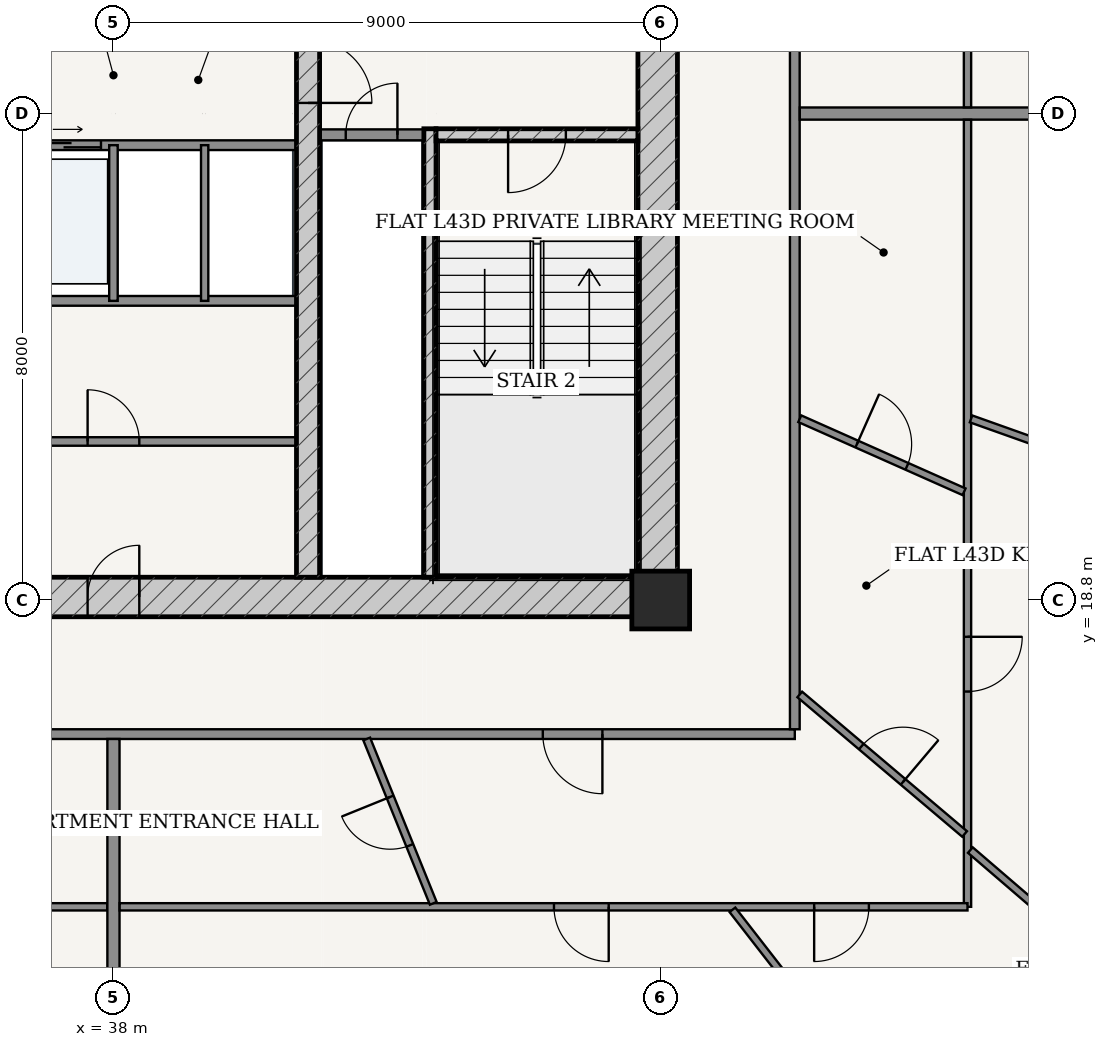
"""IFC4 building model, lengths in metres.
Left out: names, types, materials, properties, quantities, classifications, styles, units other than length and angle.
Written with IfcOpenShell. Run it as: python <this file> out.ifc"""

import sys

from ifc_helpers import new_model, si_unit, direction, frame, frame_2d, origin, origin_2d, place, context, subcontext, project, spatial, rectangle, extrude, source, transform, mapped, element, fill, save


model = new_model("IFC4")
c1 = context("Model", 3, precision=1e-05, world=origin(), true_north=direction((-0.2419218956, 0.970295726276)))
c2 = subcontext(c1, "Body", "Model", "MODEL_VIEW")
j1 = project(units=[si_unit("LENGTHUNIT", "METRE"), si_unit("PLANEANGLEUNIT", "RADIAN")], contexts=[c1])
p1 = place(None, origin())
s1 = spatial("IfcSite", under=j1, at=p1, CompositionType="ELEMENT")
p2 = place(p1, origin())
s2 = spatial("IfcBuilding", under=s1, at=p2, CompositionType="ELEMENT")
p3 = place(p2, frame((0.0, 0.0, 164.2)))
s3 = spatial("IfcBuildingStorey", under=s2, at=p3, CompositionType="ELEMENT", Elevation=164.2)
p4 = place(p3, frame((47.0, 18.8, 0.0), z_axis=(0.0, 0.0, 1.0), x_axis=(1.0, 0.0, 0.0)))
e1 = element("IfcColumn", 1, at=p4, inside=s3, PredefinedType="COLUMN", context=c2, shape_type="SweptSolid", body=[
    extrude(rectangle(XDim=0.95, YDim=0.95, at=origin_2d()), origin(), (0.0, 0.0, 1.0), 3.6),
])
p5 = place(p3, frame((28.725, 18.85, 0.0), z_axis=(0.0, 0.0, 1.0), x_axis=(1.0, 0.0, 0.0)))
e2 = element("IfcWall", 2, at=p5, inside=s3, PredefinedType="SHEAR", context=c2, shape_type="SweptSolid", body=[
    extrude(rectangle(XDim=18.55, YDim=0.65, at=frame_2d((9.275, 0.0))), origin(), (0.0, 0.0, 1.0), 3.33),
])
p6 = place(p5, frame((8.85, 0.0, 0.0)))
e3 = element("IfcOpeningElement", 3, at=p6, cuts=e2, PredefinedType="OPENING", context=c2, shape_type="SweptSolid", body=[
    extrude(rectangle(XDim=0.85, YDim=2.1, at=frame_2d((0.425, 1.05))), frame((0.0, 0.335, 0.0), z_axis=(0.0, -1.0, 0.0), x_axis=(1.0, 0.0, 0.0)), (0.0, 0.0, 1.0), 0.67),
])
p7 = place(p3, frame((46.95, 19.175, 0.0), z_axis=(0.0, 0.0, 1.0), x_axis=(0.0, 1.0, 0.0)))
e4 = element("IfcWall", 4, at=p7, inside=s3, PredefinedType="SHEAR", context=c2, shape_type="SweptSolid", body=[
    extrude(rectangle(XDim=15.25, YDim=0.65, at=frame_2d((7.625, 0.0))), origin(), (0.0, 0.0, 1.0), 3.33),
])
p8 = place(p7, frame((9.875, 0.0, 0.0)))
e5 = element("IfcOpeningElement", 5, at=p8, cuts=e4, PredefinedType="OPENING", context=c2, shape_type="SweptSolid", body=[
    extrude(rectangle(XDim=1.5, YDim=2.2, at=frame_2d((0.75, 1.1))), frame((0.0, 0.335, 0.0), z_axis=(0.0, -1.0, 0.0), x_axis=(1.0, 0.0, 0.0)), (0.0, 0.0, 1.0), 0.67),
])
p9 = place(p3, frame((43.205, 19.175, 0.0), z_axis=(0.0, 0.0, 1.0), x_axis=(0.0, 1.0, 0.0)))
e6 = element("IfcWall", 6, at=p9, inside=s3, PredefinedType="SOLIDWALL", context=c2, shape_type="SweptSolid", body=[
    extrude(rectangle(XDim=7.375, YDim=0.2, at=frame_2d((3.688, 0.0))), origin(), (0.0, 0.0, 1.0), 3.33),
])
p10 = place(p3, frame((43.305, 26.45, 0.0), z_axis=(0.0, 0.0, 1.0), x_axis=(1.0, 0.0, 0.0)))
e7 = element("IfcWall", 7, at=p10, inside=s3, PredefinedType="SOLIDWALL", context=c2, shape_type="SweptSolid", body=[
    extrude(rectangle(XDim=3.32, YDim=0.2, at=frame_2d((1.66, 0.0))), origin(), (0.0, 0.0, 1.0), 3.33),
])
p11 = place(p10, frame((1.185, 0.0, 0.0)))
e8 = element("IfcOpeningElement", 8, at=p11, cuts=e7, PredefinedType="OPENING", context=c2, shape_type="SweptSolid", body=[
    extrude(rectangle(XDim=0.95, YDim=2.15, at=frame_2d((0.475, 1.075))), frame((0.0, 0.11, 0.0), z_axis=(0.0, -1.0, 0.0), x_axis=(1.0, 0.0, 0.0)), (0.0, 0.0, 1.0), 0.22),
])
p12 = place(p3, frame((41.2, 19.175, 0.0), z_axis=(0.0, 0.0, 1.0), x_axis=(0.0, 1.0, 0.0)))
e9 = element("IfcWall", 9, at=p12, inside=s3, PredefinedType="SHEAR", context=c2, shape_type="SweptSolid", body=[
    extrude(rectangle(XDim=15.25, YDim=0.38, at=frame_2d((7.625, 0.0))), origin(), (0.0, 0.0, 1.0), 3.33),
])
p13 = place(p12, frame((7.8, 0.0, 0.0)))
e10 = element("IfcOpeningElement", 10, at=p13, cuts=e9, PredefinedType="OPENING", context=c2, shape_type="SweptSolid", body=[
    extrude(rectangle(XDim=1.05, YDim=2.15, at=frame_2d((0.525, 1.075))), frame((0.0, 0.2, 0.0), z_axis=(0.0, -1.0, 0.0), x_axis=(1.0, 0.0, 0.0)), (0.0, 0.0, 1.0), 0.4),
])
p14 = place(p3, frame((41.39, 26.45, 0.0), z_axis=(0.0, 0.0, 1.0), x_axis=(1.0, 0.0, 0.0)))
e11 = element("IfcWall", 11, at=p14, inside=s3, PredefinedType="PARTITIONING", context=c2, shape_type="SweptSolid", body=[
    extrude(rectangle(XDim=1.71, YDim=0.18, at=frame_2d((0.855, 0.0))), origin(), (0.0, 0.0, 1.0), 3.33),
])
p15 = place(p14, frame((0.43, 0.0, 0.0)))
e12 = element("IfcOpeningElement", 12, at=p15, cuts=e11, PredefinedType="OPENING", context=c2, shape_type="SweptSolid", body=[
    extrude(rectangle(XDim=0.85, YDim=2.1, at=frame_2d((0.425, 1.05))), frame((0.0, 0.1, 0.0), z_axis=(0.0, -1.0, 0.0), x_axis=(1.0, 0.0, 0.0)), (0.0, 0.0, 1.0), 0.2),
])
p16 = place(p3, frame((34.99, 26.28, 0.0), z_axis=(0.0, 0.0, 1.0), x_axis=(1.0, 0.0, 0.0)))
e13 = element("IfcWall", 13, at=p16, inside=s3, PredefinedType="PARTITIONING", context=c2, shape_type="SweptSolid", body=[
    extrude(rectangle(XDim=6.02, YDim=0.16, at=frame_2d((3.01, 0.0))), origin(), (0.0, 0.0, 1.0), 3.33),
])
p17 = place(p16, frame((0.225, 0.0, 0.0)))
e14 = element("IfcOpeningElement", 14, at=p17, cuts=e13, PredefinedType="OPENING", context=c2, shape_type="SweptSolid", body=[
    extrude(rectangle(XDim=1.1, YDim=2.2, at=frame_2d((0.55, 1.1))), frame((0.0, 0.09, 0.0), z_axis=(0.0, -1.0, 0.0), x_axis=(1.0, 0.0, 0.0)), (0.0, 0.0, 1.0), 0.18),
])
p18 = place(p16, frame((1.705, 0.0, 0.0)))
e15 = element("IfcOpeningElement", 15, at=p18, cuts=e13, PredefinedType="OPENING", context=c2, shape_type="SweptSolid", body=[
    extrude(rectangle(XDim=1.1, YDim=2.2, at=frame_2d((0.55, 1.1))), frame((0.0, 0.09, 0.0), z_axis=(0.0, -1.0, 0.0), x_axis=(1.0, 0.0, 0.0)), (0.0, 0.0, 1.0), 0.18),
])
p19 = place(p3, frame((34.99, 23.72, 0.0), z_axis=(0.0, 0.0, 1.0), x_axis=(1.0, 0.0, 0.0)))
e16 = element("IfcWall", 16, at=p19, inside=s3, PredefinedType="PARTITIONING", context=c2, shape_type="SweptSolid", body=[
    extrude(rectangle(XDim=6.02, YDim=0.16, at=frame_2d((3.01, 0.0))), origin(), (0.0, 0.0, 1.0), 3.33),
])
p20 = place(p3, frame((38.0, 23.72, 0.0), z_axis=(0.0, 0.0, 1.0), x_axis=(0.0, 1.0, 0.0)))
e17 = element("IfcWall", 17, at=p20, inside=s3, PredefinedType="PARTITIONING", context=c2, shape_type="SweptSolid", body=[
    extrude(rectangle(XDim=2.56, YDim=0.14, at=frame_2d((1.28, 0.0))), origin(), (0.0, 0.0, 1.0), 3.33),
])
p21 = place(p3, frame((39.5, 23.72, 0.0), z_axis=(0.0, 0.0, 1.0), x_axis=(0.0, 1.0, 0.0)))
e18 = element("IfcWall", 18, at=p21, inside=s3, PredefinedType="PARTITIONING", context=c2, shape_type="SweptSolid", body=[
    extrude(rectangle(XDim=2.56, YDim=0.12, at=frame_2d((1.28, 0.0))), origin(), (0.0, 0.0, 1.0), 3.33),
])
p22 = place(p3, frame((34.99, 21.407, 0.0), z_axis=(0.0, 0.0, 1.0), x_axis=(1.0, 0.0, 0.0)))
e19 = element("IfcWall", 19, at=p22, inside=s3, PredefinedType="PARTITIONING", context=c2, shape_type="SweptSolid", body=[
    extrude(rectangle(XDim=6.02, YDim=0.14, at=frame_2d((3.01, 0.0))), origin(), (0.0, 0.0, 1.0), 3.33),
])
p23 = place(p22, frame((2.585, 0.0, 0.0)))
e20 = element("IfcOpeningElement", 20, at=p23, cuts=e19, PredefinedType="OPENING", context=c2, shape_type="SweptSolid", body=[
    extrude(rectangle(XDim=0.85, YDim=2.1, at=frame_2d((0.425, 1.05))), frame((0.0, 0.08, 0.0), z_axis=(0.0, -1.0, 0.0), x_axis=(1.0, 0.0, 0.0)), (0.0, 0.0, 1.0), 0.16),
])
p24 = place(p3, frame((34.32, 16.595, 0.0), z_axis=(0.0, 0.0, 1.0), x_axis=(1.0, 0.0, 0.0)))
e21 = element("IfcWall", 21, at=p24, inside=s3, PredefinedType="PARTITIONING", context=c2, shape_type="SweptSolid", body=[
    extrude(rectangle(XDim=14.885, YDim=0.16, at=frame_2d((7.442, 0.0))), origin(), (0.0, 0.0, 1.0), 2.776),
])
p25 = place(p24, frame((1.484, 0.0, 0.0)))
e22 = element("IfcOpeningElement", 22, at=p25, cuts=e21, PredefinedType="OPENING", context=c2, shape_type="SweptSolid", body=[
    extrude(rectangle(XDim=0.98, YDim=2.2, at=frame_2d((0.49, 1.1))), frame((0.0, 0.09, 0.0), z_axis=(0.0, -1.0, 0.0), x_axis=(1.0, 0.0, 0.0)), (0.0, 0.0, 1.0), 0.18),
])
p26 = place(p24, frame((10.741, 0.0, 0.0)))
e23 = element("IfcOpeningElement", 23, at=p26, cuts=e21, PredefinedType="OPENING", context=c2, shape_type="SweptSolid", body=[
    extrude(rectangle(XDim=0.98, YDim=2.2, at=frame_2d((0.49, 1.1))), frame((0.0, 0.09, 0.0), z_axis=(0.0, -1.0, 0.0), x_axis=(1.0, 0.0, 0.0)), (0.0, 0.0, 1.0), 0.18),
])
p27 = place(p3, frame((49.205, 16.675, 0.0), z_axis=(0.0, 0.0, 1.0), x_axis=(0.0, 1.0, 0.0)))
e24 = element("IfcWall", 24, at=p27, inside=s3, PredefinedType="PARTITIONING", context=c2, shape_type="SweptSolid", body=[
    extrude(rectangle(XDim=18.4, YDim=0.16, at=frame_2d((9.2, 0.0))), origin(), (0.0, 0.0, 1.0), 2.776),
])
p28 = place(p27, frame((15.326, 0.0, 0.0)))
e25 = element("IfcOpeningElement", 25, at=p28, cuts=e24, PredefinedType="OPENING", context=c2, shape_type="SweptSolid", body=[
    extrude(rectangle(XDim=0.98, YDim=2.2, at=frame_2d((0.49, 1.1))), frame((0.0, 0.09, 0.0), z_axis=(0.0, -1.0, 0.0), x_axis=(1.0, 0.0, 0.0)), (0.0, 0.0, 1.0), 0.18),
])
p29 = place(p3, frame((49.287, 26.8, 0.0), z_axis=(0.0, 0.0, 1.0), x_axis=(1.0, 0.0, 0.0)))
e26 = element("IfcWall", 26, at=p29, inside=s3, PredefinedType="PARTITIONING", context=c2, shape_type="SweptSolid", body=[
    extrude(rectangle(XDim=12.853, YDim=0.2, at=frame_2d((6.426, 0.0))), origin(), (0.0, 0.0, 1.0), 2.846),
])
p30 = place(p3, frame((52.045, 37.995, 0.0), z_axis=(0.0, 0.0, 1.0), x_axis=(0.0, -1.0, 0.0)))
e27 = element("IfcWall", 27, at=p30, inside=s3, PredefinedType="PARTITIONING", context=c2, shape_type="SweptSolid", body=[
    extrude(rectangle(XDim=11.093, YDim=0.12, at=frame_2d((5.546, 0.0))), origin(), (0.0, 0.0, 1.0), 2.776),
])
p31 = place(p30, frame((4.638, 0.0, 0.0)))
e28 = element("IfcOpeningElement", 28, at=p31, cuts=e27, PredefinedType="OPENING", context=c2, shape_type="SweptSolid", body=[
    extrude(rectangle(XDim=0.9, YDim=2.15, at=frame_2d((0.45, 1.075))), frame((0.0, 0.07, 0.0), z_axis=(0.0, -1.0, 0.0), x_axis=(1.0, 0.0, 0.0)), (0.0, 0.0, 1.0), 0.14),
])
p32 = place(p3, frame((37.898, 13.755, 0.0), z_axis=(0.0, 0.0, 1.0), x_axis=(-1.0, 0.0, 0.0)))
e29 = element("IfcWall", 29, at=p32, inside=s3, PredefinedType="PARTITIONING", context=c2, shape_type="SweptSolid", body=[
    extrude(rectangle(XDim=6.418, YDim=0.12, at=frame_2d((3.209, 0.0))), origin(), (0.0, 0.0, 1.0), 2.776),
])
p33 = place(p32, frame((1.132, 0.0, 0.0)))
e30 = element("IfcOpeningElement", 30, at=p33, cuts=e29, PredefinedType="OPENING", context=c2, shape_type="SweptSolid", body=[
    extrude(rectangle(XDim=0.9, YDim=2.15, at=frame_2d((0.45, 1.075))), frame((0.0, 0.07, 0.0), z_axis=(0.0, -1.0, 0.0), x_axis=(1.0, 0.0, 0.0)), (0.0, 0.0, 1.0), 0.14),
])
p34 = place(p3, frame((38.0, 16.515, 0.0), z_axis=(0.0, 0.0, 1.0), x_axis=(0.0, -1.0, 0.0)))
e31 = element("IfcWall", 31, at=p34, inside=s3, PredefinedType="PARTITIONING", context=c2, shape_type="SweptSolid", body=[
    extrude(rectangle(XDim=10.455, YDim=0.2, at=frame_2d((5.228, 0.0))), origin(), (0.0, 0.0, 1.0), 2.846),
])
p35 = place(p3, frame((52.045, 26.698, 0.0), z_axis=(0.0, 0.0, 1.0), x_axis=(0.0, -1.0, 0.0)))
e32 = element("IfcWall", 32, at=p35, inside=s3, PredefinedType="PARTITIONING", context=c2, shape_type="SweptSolid", body=[
    extrude(rectangle(XDim=12.943, YDim=0.12, at=frame_2d((6.472, 0.0))), origin(), (0.0, 0.0, 1.0), 2.776),
])
p36 = place(p35, frame((8.503, 0.0, 0.0)))
e33 = element("IfcOpeningElement", 33, at=p36, cuts=e32, PredefinedType="OPENING", context=c2, shape_type="SweptSolid", body=[
    extrude(rectangle(XDim=0.9, YDim=2.15, at=frame_2d((0.45, 1.075))), frame((0.0, 0.07, 0.0), z_axis=(0.0, -1.0, 0.0), x_axis=(1.0, 0.0, 0.0)), (0.0, 0.0, 1.0), 0.14),
])
p37 = place(p3, frame((52.045, 13.755, 0.0), z_axis=(0.0, 0.0, 1.0), x_axis=(-1.0, 0.0, 0.0)))
e34 = element("IfcWall", 34, at=p37, inside=s3, PredefinedType="PARTITIONING", context=c2, shape_type="SweptSolid", body=[
    extrude(rectangle(XDim=13.943, YDim=0.12, at=frame_2d((6.971, 0.0))), origin(), (0.0, 0.0, 1.0), 2.776),
])
p38 = place(p37, frame((5.9, 0.0, 0.0)))
e35 = element("IfcOpeningElement", 35, at=p38, cuts=e34, PredefinedType="OPENING", context=c2, shape_type="SweptSolid", body=[
    extrude(rectangle(XDim=0.9, YDim=2.15, at=frame_2d((0.45, 1.075))), frame((0.0, 0.07, 0.0), z_axis=(0.0, -1.0, 0.0), x_axis=(1.0, 0.0, 0.0)), (0.0, 0.0, 1.0), 0.14),
])
p39 = place(p37, frame((1.622, 0.0, 0.0)))
e36 = element("IfcOpeningElement", 36, at=p39, cuts=e34, PredefinedType="OPENING", context=c2, shape_type="SweptSolid", body=[
    extrude(rectangle(XDim=0.9, YDim=2.15, at=frame_2d((0.45, 1.075))), frame((0.0, 0.07, 0.0), z_axis=(0.0, -1.0, 0.0), x_axis=(1.0, 0.0, 0.0)), (0.0, 0.0, 1.0), 0.14),
])
p40 = place(p3, frame((48.179, 13.706, 0.0), z_axis=(0.0, 0.0, 1.0), x_axis=(0.613759011764, -0.789493429662, 0.0)))
e37 = element("IfcWall", 37, at=p40, inside=s3, PredefinedType="PARTITIONING", context=c2, shape_type="SweptSolid", body=[
    extrude(rectangle(XDim=5.212, YDim=0.12, at=frame_2d((2.606, 0.0))), origin(), (0.0, 0.0, 1.0), 2.776),
])
p41 = place(p3, frame((52.092, 14.688, 0.0), z_axis=(0.0, 0.0, 1.0), x_axis=(0.758367509429, -0.651827216862, 0.0)))
e38 = element("IfcWall", 38, at=p41, inside=s3, PredefinedType="PARTITIONING", context=c2, shape_type="SweptSolid", body=[
    extrude(rectangle(XDim=3.918, YDim=0.12, at=frame_2d((1.959, 0.0))), origin(), (0.0, 0.0, 1.0), 2.846),
])
p42 = place(p3, frame((52.104, 21.779, 0.0), z_axis=(0.0, 0.0, 1.0), x_axis=(0.942081743482, -0.335383345736, 0.0)))
e39 = element("IfcWall", 39, at=p42, inside=s3, PredefinedType="PARTITIONING", context=c2, shape_type="SweptSolid", body=[
    extrude(rectangle(XDim=8.7, YDim=0.12, at=frame_2d((4.35, 0.0))), origin(), (0.0, 0.0, 1.0), 2.846),
])
p43 = place(p42, frame((3.9, 0.0, 0.0)))
e40 = element("IfcOpeningElement", 40, at=p43, cuts=e39, PredefinedType="OPENING", context=c2, shape_type="SweptSolid", body=[
    extrude(rectangle(XDim=0.9, YDim=2.15, at=frame_2d((0.45, 1.075))), frame((0.0, 0.07, 0.0), z_axis=(0.0, -1.0, 0.0), x_axis=(1.0, 0.0, 0.0)), (0.0, 0.0, 1.0), 0.14),
])
p44 = place(p3, frame((42.165, 16.515, 0.0), z_axis=(0.0, 0.0, 1.0), x_axis=(0.375386324206, -0.926868441365, 0.0)))
e41 = element("IfcWall", 41, at=p44, inside=s3, PredefinedType="PARTITIONING", context=c2, shape_type="SweptSolid", body=[
    extrude(rectangle(XDim=2.916, YDim=0.12, at=frame_2d((1.458, 0.0))), origin(), (0.0, 0.0, 1.0), 3.005),
])
p45 = place(p44, frame((1.028, 0.0, 0.0)))
e42 = element("IfcOpeningElement", 42, at=p45, cuts=e41, PredefinedType="OPENING", context=c2, shape_type="SweptSolid", body=[
    extrude(rectangle(XDim=0.86, YDim=2.15, at=frame_2d((0.43, 1.075))), frame((0.0, 0.07, 0.0), z_axis=(0.0, -1.0, 0.0), x_axis=(1.0, 0.0, 0.0)), (0.0, 0.0, 1.0), 0.14),
])
p46 = place(p3, frame((49.287, 17.248, 0.0), z_axis=(0.0, 0.0, 1.0), x_axis=(0.763274158734, -0.646074731443, 0.0)))
e43 = element("IfcWall", 43, at=p46, inside=s3, PredefinedType="PARTITIONING", context=c2, shape_type="SweptSolid", body=[
    extrude(rectangle(XDim=3.552, YDim=0.12, at=frame_2d((1.776, 0.0))), origin(), (0.0, 0.0, 1.0), 3.005),
])
p47 = place(p46, frame((1.326, 0.0, 0.0)))
e44 = element("IfcOpeningElement", 44, at=p47, cuts=e43, PredefinedType="OPENING", context=c2, shape_type="SweptSolid", body=[
    extrude(rectangle(XDim=0.9, YDim=2.15, at=frame_2d((0.45, 1.075))), frame((0.0, 0.07, 0.0), z_axis=(0.0, -1.0, 0.0), x_axis=(1.0, 0.0, 0.0)), (0.0, 0.0, 1.0), 0.14),
])
p48 = place(p3, frame((49.287, 21.781, 0.0), z_axis=(0.0, 0.0, 1.0), x_axis=(0.913743428873, -0.406291700864, 0.0)))
e45 = element("IfcWall", 45, at=p48, inside=s3, PredefinedType="PARTITIONING", context=c2, shape_type="SweptSolid", body=[
    extrude(rectangle(XDim=2.957, YDim=0.12, at=frame_2d((1.478, 0.0))), origin(), (0.0, 0.0, 1.0), 3.33),
])
p49 = place(p48, frame((1.028, 0.0, 0.0)))
e46 = element("IfcOpeningElement", 46, at=p49, cuts=e45, PredefinedType="OPENING", context=c2, shape_type="SweptSolid", body=[
    extrude(rectangle(XDim=0.9, YDim=2.15, at=frame_2d((0.45, 1.075))), frame((0.0, 0.07, 0.0), z_axis=(0.0, -1.0, 0.0), x_axis=(1.0, 0.0, 0.0)), (0.0, 0.0, 1.0), 0.14),
])
m1 = source(origin(), c2, "Body", "SweptSolid", [
    extrude(rectangle(XDim=1.05, YDim=2.15, at=frame_2d((0.525, 1.075))), frame((0.0, 0.025, 0.0), z_axis=(0.0, -1.0, 0.0), x_axis=(1.0, 0.0, 0.0)), (0.0, 0.0, 1.0), 0.05),
])
p50 = place(p13, frame((1.05, 0.0, 0.0), z_axis=(0.0, 0.0, 1.0), x_axis=(-1.0, 0.0, 0.0)))
e47 = element("IfcDoor", 47, at=p50, inside=s3, OperationType="SINGLE_SWING_RIGHT", PredefinedType="DOOR", context=c2, shape_type="MappedRepresentation", body=[
    mapped(m1, transform((0.0, 0.0, 0.0), scale=1.0)),
])
fill(e10, e47)
m2 = source(origin(), c2, "Body", "SweptSolid", [
    extrude(rectangle(XDim=0.95, YDim=2.15, at=frame_2d((0.475, 1.075))), frame((0.0, 0.025, 0.0), z_axis=(0.0, -1.0, 0.0), x_axis=(1.0, 0.0, 0.0)), (0.0, 0.0, 1.0), 0.05),
])
p51 = place(p11, frame((0.95, 0.0, 0.0), z_axis=(0.0, 0.0, 1.0), x_axis=(-1.0, 0.0, 0.0)))
e48 = element("IfcDoor", 48, at=p51, inside=s3, OperationType="SINGLE_SWING_RIGHT", PredefinedType="DOOR", context=c2, shape_type="MappedRepresentation", body=[
    mapped(m2, transform((0.0, 0.0, 0.0), scale=1.0)),
])
fill(e8, e48)
m3 = source(origin(), c2, "Body", "SweptSolid", [
    extrude(rectangle(XDim=0.85, YDim=2.1, at=frame_2d((0.425, 1.05))), frame((0.0, 0.025, 0.0), z_axis=(0.0, -1.0, 0.0), x_axis=(1.0, 0.0, 0.0)), (0.0, 0.0, 1.0), 0.05),
])
p52 = place(p15, origin())
e49 = element("IfcDoor", 49, at=p52, inside=s3, OperationType="SINGLE_SWING_RIGHT", PredefinedType="DOOR", context=c2, shape_type="MappedRepresentation", body=[
    mapped(m3, transform((0.0, 0.0, 0.0), scale=1.0)),
])
fill(e12, e49)
p53 = place(p6, origin())
e50 = element("IfcDoor", 50, at=p53, inside=s3, OperationType="SINGLE_SWING_RIGHT", PredefinedType="DOOR", context=c2, shape_type="MappedRepresentation", body=[
    mapped(m3, transform((0.0, 0.0, 0.0), scale=1.0)),
])
fill(e3, e50)
p54 = place(p23, origin())
e51 = element("IfcDoor", 51, at=p54, inside=s3, OperationType="SINGLE_SWING_LEFT", PredefinedType="DOOR", context=c2, shape_type="MappedRepresentation", body=[
    mapped(m3, transform((0.0, 0.0, 0.0), scale=1.0)),
])
fill(e20, e51)
m4 = source(origin(), c2, "Body", "SweptSolid", [
    extrude(rectangle(XDim=1.1, YDim=2.2, at=frame_2d((0.55, 1.1))), frame((0.0, 0.025, 0.0), z_axis=(0.0, -1.0, 0.0), x_axis=(1.0, 0.0, 0.0)), (0.0, 0.0, 1.0), 0.05),
])
p55 = place(p18, origin())
e52 = element("IfcDoor", 52, at=p55, inside=s3, OperationType="DOUBLE_DOOR_SLIDING", PredefinedType="DOOR", context=c2, shape_type="MappedRepresentation", body=[
    mapped(m4, transform((0.0, 0.0, 0.0), scale=1.0)),
])
fill(e15, e52)
m5 = source(origin(), c2, "Body", "SweptSolid", [
    extrude(rectangle(XDim=0.98, YDim=2.2, at=frame_2d((0.49, 1.1))), frame((0.0, 0.025, 0.0), z_axis=(0.0, -1.0, 0.0), x_axis=(1.0, 0.0, 0.0)), (0.0, 0.0, 1.0), 0.05),
])
p56 = place(p26, frame((0.98, 0.0, 0.0), z_axis=(0.0, 0.0, 1.0), x_axis=(-1.0, 0.0, 0.0)))
e53 = element("IfcDoor", 53, at=p56, inside=s3, OperationType="SINGLE_SWING_LEFT", PredefinedType="DOOR", context=c2, shape_type="MappedRepresentation", body=[
    mapped(m5, transform((0.0, 0.0, 0.0), scale=1.0)),
])
fill(e23, e53)
m6 = source(origin(), c2, "Body", "SweptSolid", [
    extrude(rectangle(XDim=0.86, YDim=2.15, at=frame_2d((0.43, 1.075))), frame((0.0, 0.025, 0.0), z_axis=(0.0, -1.0, 0.0), x_axis=(1.0, 0.0, 0.0)), (0.0, 0.0, 1.0), 0.05),
])
p57 = place(p45, frame((0.86, 0.0, 0.0), z_axis=(0.0, 0.0, 1.0), x_axis=(-1.0, 0.0, 0.0)))
e54 = element("IfcDoor", 54, at=p57, inside=s3, OperationType="SINGLE_SWING_RIGHT", PredefinedType="DOOR", context=c2, shape_type="MappedRepresentation", body=[
    mapped(m6, transform((0.0, 0.0, 0.0), scale=1.0)),
])
fill(e42, e54)
m7 = source(origin(), c2, "Body", "SweptSolid", [
    extrude(rectangle(XDim=0.9, YDim=2.15, at=frame_2d((0.45, 1.075))), frame((0.0, 0.025, 0.0), z_axis=(0.0, -1.0, 0.0), x_axis=(1.0, 0.0, 0.0)), (0.0, 0.0, 1.0), 0.05),
])
p58 = place(p38, origin())
e55 = element("IfcDoor", 55, at=p58, inside=s3, OperationType="SINGLE_SWING_LEFT", PredefinedType="DOOR", context=c2, shape_type="MappedRepresentation", body=[
    mapped(m7, transform((0.0, 0.0, 0.0), scale=1.0)),
])
fill(e35, e55)
p59 = place(p47, origin())
e56 = element("IfcDoor", 56, at=p59, inside=s3, OperationType="SINGLE_SWING_RIGHT", PredefinedType="DOOR", context=c2, shape_type="MappedRepresentation", body=[
    mapped(m7, transform((0.0, 0.0, 0.0), scale=1.0)),
])
fill(e44, e56)
p60 = place(p49, origin())
e57 = element("IfcDoor", 57, at=p60, inside=s3, OperationType="SINGLE_SWING_LEFT", PredefinedType="DOOR", context=c2, shape_type="MappedRepresentation", body=[
    mapped(m7, transform((0.0, 0.0, 0.0), scale=1.0)),
])
fill(e46, e57)
p61 = place(p39, origin())
e58 = element("IfcDoor", 58, at=p61, inside=s3, OperationType="SINGLE_SWING_RIGHT", PredefinedType="DOOR", context=c2, shape_type="MappedRepresentation", body=[
    mapped(m7, transform((0.0, 0.0, 0.0), scale=1.0)),
])
fill(e36, e58)
p62 = place(p36, origin())
e59 = element("IfcDoor", 59, at=p62, inside=s3, OperationType="SINGLE_SWING_LEFT", PredefinedType="DOOR", context=c2, shape_type="MappedRepresentation", body=[
    mapped(m7, transform((0.0, 0.0, 0.0), scale=1.0)),
])
fill(e33, e59)
save(model, sys.argv[1])
